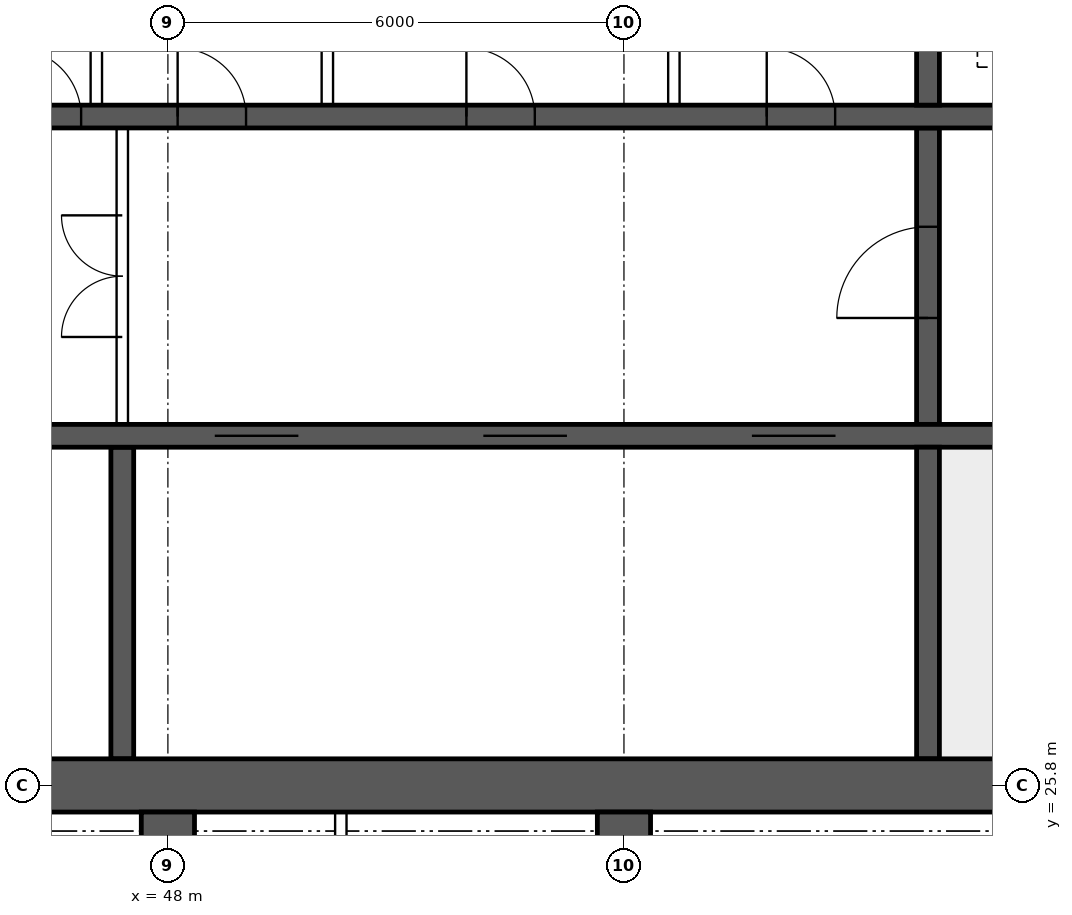
"""IFC4 building model, lengths in metres.
Left out: names, types, materials, properties, quantities, classifications, styles, units other than length and angle.
Written with IfcOpenShell. Run it as: python <this file> out.ifc"""

import sys

from ifc_helpers import new_model, si_unit, direction, frame, frame_2d, origin, place, context, subcontext, project, spatial, rectangle, extrude, element, fill, save


model = new_model("IFC4")
c1 = context("Model", 3, precision=1e-05, world=origin(), true_north=direction((0.0, 1.0)))
c2 = subcontext(c1, "Body", "Model", "MODEL_VIEW")
j1 = project(units=[si_unit("LENGTHUNIT", "METRE"), si_unit("PLANEANGLEUNIT", "RADIAN")], contexts=[c1])
p1 = place(None, origin())
s1 = spatial("IfcSite", under=j1, at=p1, CompositionType="ELEMENT")
p2 = place(p1, origin())
s2 = spatial("IfcBuilding", under=s1, at=p2, CompositionType="ELEMENT")
p3 = place(p2, frame((0.0, 0.0, 242.8)))
s3 = spatial("IfcBuildingStorey", under=s2, at=p3, CompositionType="ELEMENT", Elevation=242.8)
p4 = place(p3, frame((18.0, 25.8, 0.0), z_axis=(0.0, 0.0, 1.0), x_axis=(1.0, 0.0, 0.0)))
e1 = element("IfcWall", 1, at=p4, inside=s3, PredefinedType="SHEAR", context=c2, shape_type="SweptSolid", body=[
    extrude(rectangle(XDim=48.0, YDim=0.7, at=frame_2d((24.0, 0.0))), origin(), (0.0, 0.0, 1.0), 3.75),
])
p5 = place(p3, frame((18.35, 30.4, 0.0), z_axis=(0.0, 0.0, 1.0), x_axis=(1.0, 0.0, 0.0)))
e2 = element("IfcWall", 2, at=p5, inside=s3, PredefinedType="SHEAR", context=c2, shape_type="SweptSolid", body=[
    extrude(rectangle(XDim=47.3, YDim=0.3, at=frame_2d((23.65, 0.0))), origin(), (0.0, 0.0, 1.0), 3.75),
])
p6 = place(p5, frame((0.4, 0.0, 0.0)))
e3 = element("IfcOpeningElement", 3, at=p6, cuts=e2, PredefinedType="OPENING", context=c2, shape_type="SweptSolid", body=[
    extrude(rectangle(XDim=1.0, YDim=2.1, at=frame_2d((0.5, 1.05))), frame((0.0, 0.16, 0.0), z_axis=(0.0, -1.0, 0.0), x_axis=(1.0, 0.0, 0.0)), (0.0, 0.0, 1.0), 0.32),
])
p7 = place(p5, frame((45.9, 0.0, 0.0)))
e4 = element("IfcOpeningElement", 4, at=p7, cuts=e2, PredefinedType="OPENING", context=c2, shape_type="SweptSolid", body=[
    extrude(rectangle(XDim=1.0, YDim=2.1, at=frame_2d((0.5, 1.05))), frame((0.0, 0.16, 0.0), z_axis=(0.0, -1.0, 0.0), x_axis=(1.0, 0.0, 0.0)), (0.0, 0.0, 1.0), 0.32),
])
p8 = place(p5, frame((8.4, 0.0, 0.0)))
e5 = element("IfcOpeningElement", 5, at=p8, cuts=e2, PredefinedType="OPENING", context=c2, shape_type="SweptSolid", body=[
    extrude(rectangle(XDim=1.1, YDim=2.1, at=frame_2d((0.55, 1.05))), frame((0.0, 0.16, 0.0), z_axis=(0.0, -1.0, 0.0), x_axis=(1.0, 0.0, 0.0)), (0.0, 0.0, 1.0), 0.32),
])
p9 = place(p5, frame((11.0, 0.0, 0.0)))
e6 = element("IfcOpeningElement", 6, at=p9, cuts=e2, PredefinedType="OPENING", context=c2, shape_type="SweptSolid", body=[
    extrude(rectangle(XDim=1.1, YDim=2.1, at=frame_2d((0.55, 1.05))), frame((0.0, 0.16, 0.0), z_axis=(0.0, -1.0, 0.0), x_axis=(1.0, 0.0, 0.0)), (0.0, 0.0, 1.0), 0.32),
])
p10 = place(p5, frame((13.6, 0.0, 0.0)))
e7 = element("IfcOpeningElement", 7, at=p10, cuts=e2, PredefinedType="OPENING", context=c2, shape_type="SweptSolid", body=[
    extrude(rectangle(XDim=1.1, YDim=2.1, at=frame_2d((0.55, 1.05))), frame((0.0, 0.16, 0.0), z_axis=(0.0, -1.0, 0.0), x_axis=(1.0, 0.0, 0.0)), (0.0, 0.0, 1.0), 0.32),
])
p11 = place(p5, frame((16.2, 0.0, 0.0)))
e8 = element("IfcOpeningElement", 8, at=p11, cuts=e2, PredefinedType="OPENING", context=c2, shape_type="SweptSolid", body=[
    extrude(rectangle(XDim=1.1, YDim=2.1, at=frame_2d((0.55, 1.05))), frame((0.0, 0.16, 0.0), z_axis=(0.0, -1.0, 0.0), x_axis=(1.0, 0.0, 0.0)), (0.0, 0.0, 1.0), 0.32),
])
p12 = place(p5, frame((18.975, 0.0, 0.0)))
e9 = element("IfcOpeningElement", 9, at=p12, cuts=e2, PredefinedType="OPENING", context=c2, shape_type="SweptSolid", body=[
    extrude(rectangle(XDim=0.9, YDim=2.1, at=frame_2d((0.45, 1.05))), frame((0.0, 0.16, 0.0), z_axis=(0.0, -1.0, 0.0), x_axis=(1.0, 0.0, 0.0)), (0.0, 0.0, 1.0), 0.32),
])
p13 = place(p5, frame((24.475, 0.0, 0.0)))
e10 = element("IfcOpeningElement", 10, at=p13, cuts=e2, PredefinedType="OPENING", context=c2, shape_type="SweptSolid", body=[
    extrude(rectangle(XDim=0.9, YDim=2.1, at=frame_2d((0.45, 1.05))), frame((0.0, 0.16, 0.0), z_axis=(0.0, -1.0, 0.0), x_axis=(1.0, 0.0, 0.0)), (0.0, 0.0, 1.0), 0.32),
])
p14 = place(p5, frame((30.267, 0.0, 0.0)))
e11 = element("IfcOpeningElement", 11, at=p14, cuts=e2, PredefinedType="OPENING", context=c2, shape_type="SweptSolid", body=[
    extrude(rectangle(XDim=1.1, YDim=2.1, at=frame_2d((0.55, 1.05))), frame((0.0, 0.16, 0.0), z_axis=(0.0, -1.0, 0.0), x_axis=(1.0, 0.0, 0.0)), (0.0, 0.0, 1.0), 0.32),
])
p15 = place(p5, frame((33.8, 0.0, 0.0)))
e12 = element("IfcOpeningElement", 12, at=p15, cuts=e2, PredefinedType="OPENING", context=c2, shape_type="SweptSolid", body=[
    extrude(rectangle(XDim=1.1, YDim=2.1, at=frame_2d((0.55, 1.05))), frame((0.0, 0.16, 0.0), z_axis=(0.0, -1.0, 0.0), x_axis=(1.0, 0.0, 0.0)), (0.0, 0.0, 1.0), 0.32),
])
p16 = place(p5, frame((37.333, 0.0, 0.0)))
e13 = element("IfcOpeningElement", 13, at=p16, cuts=e2, PredefinedType="OPENING", context=c2, shape_type="SweptSolid", body=[
    extrude(rectangle(XDim=1.1, YDim=2.1, at=frame_2d((0.55, 1.05))), frame((0.0, 0.16, 0.0), z_axis=(0.0, -1.0, 0.0), x_axis=(1.0, 0.0, 0.0)), (0.0, 0.0, 1.0), 0.32),
])
p17 = place(p3, frame((18.35, 34.6, 0.0), z_axis=(0.0, 0.0, 1.0), x_axis=(1.0, 0.0, 0.0)))
e14 = element("IfcWall", 14, at=p17, inside=s3, PredefinedType="SHEAR", context=c2, shape_type="SweptSolid", body=[
    extrude(rectangle(XDim=47.3, YDim=0.3, at=frame_2d((23.65, 0.0))), origin(), (0.0, 0.0, 1.0), 3.75),
])
p18 = place(p17, frame((0.9, 0.0, 0.0)))
e15 = element("IfcOpeningElement", 15, at=p18, cuts=e14, PredefinedType="OPENING", context=c2, shape_type="SweptSolid", body=[
    extrude(rectangle(XDim=1.1, YDim=2.1, at=frame_2d((0.55, 1.05))), frame((0.0, 0.16, 0.0), z_axis=(0.0, -1.0, 0.0), x_axis=(1.0, 0.0, 0.0)), (0.0, 0.0, 1.0), 0.32),
])
p19 = place(p17, frame((45.3, 0.0, 0.0)))
e16 = element("IfcOpeningElement", 16, at=p19, cuts=e14, PredefinedType="OPENING", context=c2, shape_type="SweptSolid", body=[
    extrude(rectangle(XDim=1.1, YDim=2.1, at=frame_2d((0.55, 1.05))), frame((0.0, 0.16, 0.0), z_axis=(0.0, -1.0, 0.0), x_axis=(1.0, 0.0, 0.0)), (0.0, 0.0, 1.0), 0.32),
])
p20 = place(p17, frame((4.25, 0.0, 0.0)))
e17 = element("IfcOpeningElement", 17, at=p20, cuts=e14, PredefinedType="OPENING", context=c2, shape_type="SweptSolid", body=[
    extrude(rectangle(XDim=0.9, YDim=2.1, at=frame_2d((0.45, 1.05))), frame((0.0, 0.16, 0.0), z_axis=(0.0, -1.0, 0.0), x_axis=(1.0, 0.0, 0.0)), (0.0, 0.0, 1.0), 0.32),
])
p21 = place(p17, frame((42.15, 0.0, 0.0)))
e18 = element("IfcOpeningElement", 18, at=p21, cuts=e14, PredefinedType="OPENING", context=c2, shape_type="SweptSolid", body=[
    extrude(rectangle(XDim=0.9, YDim=2.1, at=frame_2d((0.45, 1.05))), frame((0.0, 0.16, 0.0), z_axis=(0.0, -1.0, 0.0), x_axis=(1.0, 0.0, 0.0)), (0.0, 0.0, 1.0), 0.32),
])
p22 = place(p17, frame((9.025, 0.0, 0.0)))
e19 = element("IfcOpeningElement", 19, at=p22, cuts=e14, PredefinedType="OPENING", context=c2, shape_type="SweptSolid", body=[
    extrude(rectangle(XDim=0.9, YDim=2.1, at=frame_2d((0.45, 1.05))), frame((0.0, 0.16, 0.0), z_axis=(0.0, -1.0, 0.0), x_axis=(1.0, 0.0, 0.0)), (0.0, 0.0, 1.0), 0.32),
])
p23 = place(p17, frame((12.999, 0.0, 0.0)))
e20 = element("IfcOpeningElement", 20, at=p23, cuts=e14, PredefinedType="OPENING", context=c2, shape_type="SweptSolid", body=[
    extrude(rectangle(XDim=0.9, YDim=2.1, at=frame_2d((0.45, 1.05))), frame((0.0, 0.16, 0.0), z_axis=(0.0, -1.0, 0.0), x_axis=(1.0, 0.0, 0.0)), (0.0, 0.0, 1.0), 0.32),
])
p24 = place(p17, frame((16.646, 0.0, 0.0)))
e21 = element("IfcOpeningElement", 21, at=p24, cuts=e14, PredefinedType="OPENING", context=c2, shape_type="SweptSolid", body=[
    extrude(rectangle(XDim=0.9, YDim=2.1, at=frame_2d((0.45, 1.05))), frame((0.0, 0.16, 0.0), z_axis=(0.0, -1.0, 0.0), x_axis=(1.0, 0.0, 0.0)), (0.0, 0.0, 1.0), 0.32),
])
p25 = place(p17, frame((20.405, 0.0, 0.0)))
e22 = element("IfcOpeningElement", 22, at=p25, cuts=e14, PredefinedType="OPENING", context=c2, shape_type="SweptSolid", body=[
    extrude(rectangle(XDim=0.9, YDim=2.1, at=frame_2d((0.45, 1.05))), frame((0.0, 0.16, 0.0), z_axis=(0.0, -1.0, 0.0), x_axis=(1.0, 0.0, 0.0)), (0.0, 0.0, 1.0), 0.32),
])
p26 = place(p17, frame((24.811, 0.0, 0.0)))
e23 = element("IfcOpeningElement", 23, at=p26, cuts=e14, PredefinedType="OPENING", context=c2, shape_type="SweptSolid", body=[
    extrude(rectangle(XDim=0.9, YDim=2.1, at=frame_2d((0.45, 1.05))), frame((0.0, 0.16, 0.0), z_axis=(0.0, -1.0, 0.0), x_axis=(1.0, 0.0, 0.0)), (0.0, 0.0, 1.0), 0.32),
])
p27 = place(p17, frame((27.608, 0.0, 0.0)))
e24 = element("IfcOpeningElement", 24, at=p27, cuts=e14, PredefinedType="OPENING", context=c2, shape_type="SweptSolid", body=[
    extrude(rectangle(XDim=0.9, YDim=2.1, at=frame_2d((0.45, 1.05))), frame((0.0, 0.16, 0.0), z_axis=(0.0, -1.0, 0.0), x_axis=(1.0, 0.0, 0.0)), (0.0, 0.0, 1.0), 0.32),
])
p28 = place(p17, frame((29.778, 0.0, 0.0)))
e25 = element("IfcOpeningElement", 25, at=p28, cuts=e14, PredefinedType="OPENING", context=c2, shape_type="SweptSolid", body=[
    extrude(rectangle(XDim=0.9, YDim=2.1, at=frame_2d((0.45, 1.05))), frame((0.0, 0.16, 0.0), z_axis=(0.0, -1.0, 0.0), x_axis=(1.0, 0.0, 0.0)), (0.0, 0.0, 1.0), 0.32),
])
p29 = place(p17, frame((33.577, 0.0, 0.0)))
e26 = element("IfcOpeningElement", 26, at=p29, cuts=e14, PredefinedType="OPENING", context=c2, shape_type="SweptSolid", body=[
    extrude(rectangle(XDim=0.9, YDim=2.1, at=frame_2d((0.45, 1.05))), frame((0.0, 0.16, 0.0), z_axis=(0.0, -1.0, 0.0), x_axis=(1.0, 0.0, 0.0)), (0.0, 0.0, 1.0), 0.32),
])
p30 = place(p17, frame((37.528, 0.0, 0.0)))
e27 = element("IfcOpeningElement", 27, at=p30, cuts=e14, PredefinedType="OPENING", context=c2, shape_type="SweptSolid", body=[
    extrude(rectangle(XDim=0.9, YDim=2.1, at=frame_2d((0.45, 1.05))), frame((0.0, 0.16, 0.0), z_axis=(0.0, -1.0, 0.0), x_axis=(1.0, 0.0, 0.0)), (0.0, 0.0, 1.0), 0.32),
])
p31 = place(p3, frame((58.0, 26.15, 0.0), z_axis=(0.0, 0.0, 1.0), x_axis=(0.0, 1.0, 0.0)))
e28 = element("IfcWall", 28, at=p31, inside=s3, PredefinedType="SHEAR", context=c2, shape_type="SweptSolid", body=[
    extrude(rectangle(XDim=4.1, YDim=0.3, at=frame_2d((2.05, 0.0))), origin(), (0.0, 0.0, 1.0), 3.75),
])
p32 = place(p3, frame((58.0, 30.55, 0.0), z_axis=(0.0, 0.0, 1.0), x_axis=(0.0, 1.0, 0.0)))
e29 = element("IfcWall", 29, at=p32, inside=s3, PredefinedType="SHEAR", context=c2, shape_type="SweptSolid", body=[
    extrude(rectangle(XDim=3.9, YDim=0.3, at=frame_2d((1.95, 0.0))), origin(), (0.0, 0.0, 1.0), 3.75),
])
p33 = place(p32, frame((1.4, 0.0, 0.0)))
e30 = element("IfcOpeningElement", 30, at=p33, cuts=e29, PredefinedType="OPENING", context=c2, shape_type="SweptSolid", body=[
    extrude(rectangle(XDim=1.2, YDim=2.1, at=frame_2d((0.6, 1.05))), frame((0.0, 0.16, 0.0), z_axis=(0.0, -1.0, 0.0), x_axis=(1.0, 0.0, 0.0)), (0.0, 0.0, 1.0), 0.32),
])
p34 = place(p3, frame((58.0, 34.75, 0.0), z_axis=(0.0, 0.0, 1.0), x_axis=(0.0, 1.0, 0.0)))
e31 = element("IfcWall", 31, at=p34, inside=s3, PredefinedType="SHEAR", context=c2, shape_type="SweptSolid", body=[
    extrude(rectangle(XDim=3.1, YDim=0.3, at=frame_2d((1.55, 0.0))), origin(), (0.0, 0.0, 1.0), 3.75),
])
p35 = place(p3, frame((47.4, 26.15, 0.0), z_axis=(0.0, 0.0, 1.0), x_axis=(0.0, 1.0, 0.0)))
e32 = element("IfcWall", 32, at=p35, inside=s3, PredefinedType="SHEAR", context=c2, shape_type="SweptSolid", body=[
    extrude(rectangle(XDim=4.1, YDim=0.3, at=frame_2d((2.05, 0.0))), origin(), (0.0, 0.0, 1.0), 3.75),
])
for number, where, z_axis, x_axis in (
    (33, (48.0, 18.4, 0.0), (0.0, 0.0, 1.0), (0.0, 1.0, 0.0)),
    (34, (54.0, 18.4, 0.0), (0.0, 0.0, 1.0), (0.0, 1.0, 0.0)),
):
    element("IfcWall", number, at=place(p3, frame(where, z_axis=z_axis, x_axis=x_axis)), inside=s3, PredefinedType="SHEAR", context=c2, shape_type="SweptSolid", body=[
        extrude(rectangle(XDim=7.05, YDim=0.7, at=frame_2d((3.525, 0.0))), origin(), (0.0, 0.0, 1.0), 3.75),
    ])
p36 = place(p3, frame((47.4, 30.55, 0.0), z_axis=(0.0, 0.0, 1.0), x_axis=(0.0, 1.0, 0.0)))
e35 = element("IfcWall", 35, at=p36, inside=s3, PredefinedType="SOLIDWALL", context=c2, shape_type="SweptSolid", body=[
    extrude(rectangle(XDim=3.9, YDim=0.15, at=frame_2d((1.95, 0.0))), origin(), (0.0, 0.0, 1.0), 3.3),
])
p37 = place(p36, frame((1.15, 0.0, 0.0)))
e36 = element("IfcOpeningElement", 36, at=p37, cuts=e35, PredefinedType="OPENING", context=c2, shape_type="SweptSolid", body=[
    extrude(rectangle(XDim=1.6, YDim=2.1, at=frame_2d((0.8, 1.05))), frame((0.0, 0.085, 0.0), z_axis=(0.0, -1.0, 0.0), x_axis=(1.0, 0.0, 0.0)), (0.0, 0.0, 1.0), 0.17),
])
for number, where, z_axis, x_axis in (
    (37, (47.058, 34.75, 0.0), (0.0, 0.0, 1.0), (0.0, 1.0, 0.0)),
    (38, (50.098, 34.75, 0.0), (0.0, 0.0, 1.0), (0.0, 1.0, 0.0)),
    (39, (54.657, 34.75, 0.0), (0.0, 0.0, 1.0), (0.0, 1.0, 0.0)),
):
    element("IfcWall", number, at=place(p3, frame(where, z_axis=z_axis, x_axis=x_axis)), inside=s3, PredefinedType="SOLIDWALL", context=c2, shape_type="SweptSolid", body=[
        extrude(rectangle(XDim=3.1, YDim=0.15, at=frame_2d((1.55, 0.0))), origin(), (0.0, 0.0, 1.0), 3.3),
    ])
p38 = place(p3, frame((50.275, 18.5, 0.0), z_axis=(0.0, 0.0, 1.0), x_axis=(0.0, 1.0, 0.0)))
e40 = element("IfcWall", 40, at=p38, inside=s3, PredefinedType="PARTITIONING", context=c2, shape_type="SweptSolid", body=[
    extrude(rectangle(XDim=6.95, YDim=0.15, at=frame_2d((3.475, 0.0))), origin(), (0.0, 0.0, 1.0), 3.3),
])
p39 = place(p37, origin())
e41 = element("IfcDoor", 41, at=p39, inside=s3, OperationType="DOUBLE_DOOR_SINGLE_SWING", PredefinedType="DOOR", context=c2, shape_type="SweptSolid", body=[
    extrude(rectangle(XDim=1.6, YDim=2.1, at=frame_2d((0.8, 1.05))), frame((0.0, 0.025, 0.0), z_axis=(0.0, -1.0, 0.0), x_axis=(1.0, 0.0, 0.0)), (0.0, 0.0, 1.0), 0.05),
])
fill(e36, e41)
p40 = place(p33, origin())
e42 = element("IfcDoor", 42, at=p40, inside=s3, OperationType="SINGLE_SWING_LEFT", PredefinedType="DOOR", context=c2, shape_type="SweptSolid", body=[
    extrude(rectangle(XDim=1.2, YDim=2.1, at=frame_2d((0.6, 1.05))), frame((0.0, 0.025, 0.0), z_axis=(0.0, -1.0, 0.0), x_axis=(1.0, 0.0, 0.0)), (0.0, 0.0, 1.0), 0.05),
])
fill(e30, e42)
p41 = place(p27, origin())
e43 = element("IfcDoor", 43, at=p41, inside=s3, OperationType="SINGLE_SWING_LEFT", PredefinedType="DOOR", context=c2, shape_type="SweptSolid", body=[
    extrude(rectangle(XDim=0.9, YDim=2.1, at=frame_2d((0.45, 1.05))), frame((0.0, 0.025, 0.0), z_axis=(0.0, -1.0, 0.0), x_axis=(1.0, 0.0, 0.0)), (0.0, 0.0, 1.0), 0.05),
])
fill(e24, e43)
p42 = place(p28, origin())
e44 = element("IfcDoor", 44, at=p42, inside=s3, OperationType="SINGLE_SWING_LEFT", PredefinedType="DOOR", context=c2, shape_type="SweptSolid", body=[
    extrude(rectangle(XDim=0.9, YDim=2.1, at=frame_2d((0.45, 1.05))), frame((0.0, 0.025, 0.0), z_axis=(0.0, -1.0, 0.0), x_axis=(1.0, 0.0, 0.0)), (0.0, 0.0, 1.0), 0.05),
])
fill(e25, e44)
p43 = place(p29, origin())
e45 = element("IfcDoor", 45, at=p43, inside=s3, OperationType="SINGLE_SWING_LEFT", PredefinedType="DOOR", context=c2, shape_type="SweptSolid", body=[
    extrude(rectangle(XDim=0.9, YDim=2.1, at=frame_2d((0.45, 1.05))), frame((0.0, 0.025, 0.0), z_axis=(0.0, -1.0, 0.0), x_axis=(1.0, 0.0, 0.0)), (0.0, 0.0, 1.0), 0.05),
])
fill(e26, e45)
p44 = place(p30, origin())
e46 = element("IfcDoor", 46, at=p44, inside=s3, OperationType="SINGLE_SWING_LEFT", PredefinedType="DOOR", context=c2, shape_type="SweptSolid", body=[
    extrude(rectangle(XDim=0.9, YDim=2.1, at=frame_2d((0.45, 1.05))), frame((0.0, 0.025, 0.0), z_axis=(0.0, -1.0, 0.0), x_axis=(1.0, 0.0, 0.0)), (0.0, 0.0, 1.0), 0.05),
])
fill(e27, e46)
p45 = place(p14, origin())
e47 = element("IfcDoor", 47, at=p45, inside=s3, OperationType="DOUBLE_DOOR_SLIDING", PredefinedType="DOOR", context=c2, shape_type="SweptSolid", body=[
    extrude(rectangle(XDim=1.1, YDim=2.1, at=frame_2d((0.55, 1.05))), frame((0.0, 0.025, 0.0), z_axis=(0.0, -1.0, 0.0), x_axis=(1.0, 0.0, 0.0)), (0.0, 0.0, 1.0), 0.05),
])
fill(e11, e47)
p46 = place(p15, origin())
e48 = element("IfcDoor", 48, at=p46, inside=s3, OperationType="DOUBLE_DOOR_SLIDING", PredefinedType="DOOR", context=c2, shape_type="SweptSolid", body=[
    extrude(rectangle(XDim=1.1, YDim=2.1, at=frame_2d((0.55, 1.05))), frame((0.0, 0.025, 0.0), z_axis=(0.0, -1.0, 0.0), x_axis=(1.0, 0.0, 0.0)), (0.0, 0.0, 1.0), 0.05),
])
fill(e12, e48)
p47 = place(p16, origin())
e49 = element("IfcDoor", 49, at=p47, inside=s3, OperationType="DOUBLE_DOOR_SLIDING", PredefinedType="DOOR", context=c2, shape_type="SweptSolid", body=[
    extrude(rectangle(XDim=1.1, YDim=2.1, at=frame_2d((0.55, 1.05))), frame((0.0, 0.025, 0.0), z_axis=(0.0, -1.0, 0.0), x_axis=(1.0, 0.0, 0.0)), (0.0, 0.0, 1.0), 0.05),
])
fill(e13, e49)
save(model, sys.argv[1])
